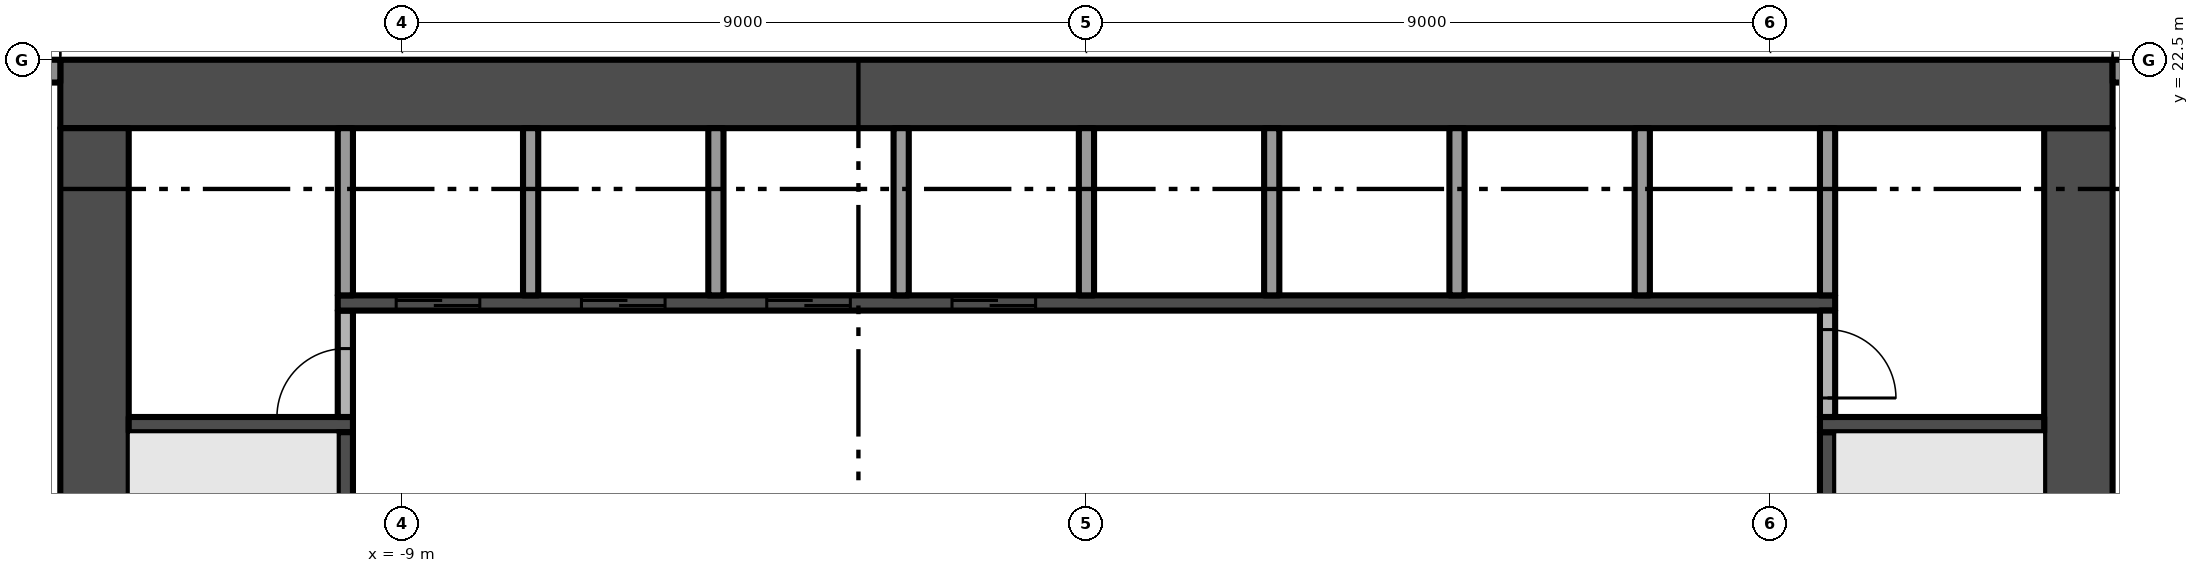
"""IFC4 building model, lengths in metres.
Left out: names, types, materials, properties, quantities, classifications, styles, units other than length and angle.
Written with IfcOpenShell. Run it as: python <this file> out.ifc"""

import sys

from ifc_helpers import new_model, si_unit, direction, frame, frame_2d, origin, place, context, subcontext, project, spatial, rectangle, extrude, element, fill, save


model = new_model("IFC4")
c1 = context("Model", 3, precision=1e-05, world=origin(), true_north=direction((0.0, 1.0)))
c2 = subcontext(c1, "Body", "Model", "MODEL_VIEW")
j1 = project(units=[si_unit("LENGTHUNIT", "METRE"), si_unit("PLANEANGLEUNIT", "RADIAN")], contexts=[c1])
p1 = place(None, origin())
s1 = spatial("IfcSite", under=j1, at=p1, CompositionType="ELEMENT")
p2 = place(p1, origin())
s2 = spatial("IfcBuilding", under=s1, at=p2, CompositionType="ELEMENT")
p3 = place(p2, frame((0.0, 0.0, 45.4)))
s3 = spatial("IfcBuildingStorey", under=s2, at=p3, CompositionType="ELEMENT", Elevation=45.4)
p4 = place(p3, frame((13.05, 5.4, -0.3), z_axis=(0.0, 0.0, 1.0), x_axis=(0.0, 1.0, 0.0)))
e1 = element("IfcWall", 1, at=p4, inside=s3, PredefinedType="SHEAR", context=c2, shape_type="SweptSolid", body=[
    extrude(rectangle(XDim=16.2, YDim=0.9, at=frame_2d((8.1, 0.0))), origin(), (0.0, 0.0, 1.0), 3.8),
])
p5 = place(p4, frame((6.0, 0.0, 0.3)))
e2 = element("IfcOpeningElement", 2, at=p5, cuts=e1, PredefinedType="OPENING", context=c2, shape_type="SweptSolid", body=[
    extrude(rectangle(XDim=1.2, YDim=2.2, at=frame_2d((0.6, 1.1))), frame((0.0, 0.46, 0.0), z_axis=(0.0, -1.0, 0.0), x_axis=(1.0, 0.0, 0.0)), (0.0, 0.0, 1.0), 0.92),
])
p6 = place(p3, frame((13.5, 22.05, -0.3), z_axis=(0.0, 0.0, 1.0), x_axis=(-1.0, 0.0, 0.0)))
e3 = element("IfcWall", 3, at=p6, inside=s3, PredefinedType="SHEAR", context=c2, shape_type="SweptSolid", body=[
    extrude(rectangle(XDim=27.0, YDim=0.9, at=frame_2d((13.5, 0.0))), origin(), (0.0, 0.0, 1.0), 3.8),
])
p7 = place(p3, frame((-13.05, 21.6, -0.3), z_axis=(0.0, 0.0, 1.0), x_axis=(0.0, -1.0, 0.0)))
e4 = element("IfcWall", 4, at=p7, inside=s3, PredefinedType="SHEAR", context=c2, shape_type="SweptSolid", body=[
    extrude(rectangle(XDim=16.2, YDim=0.9, at=frame_2d((8.1, 0.0))), origin(), (0.0, 0.0, 1.0), 3.8),
])
p8 = place(p7, frame((9.0, 0.0, 0.3)))
e5 = element("IfcOpeningElement", 5, at=p8, cuts=e4, PredefinedType="OPENING", context=c2, shape_type="SweptSolid", body=[
    extrude(rectangle(XDim=1.2, YDim=2.2, at=frame_2d((0.6, 1.1))), frame((0.0, 0.46, 0.0), z_axis=(0.0, -1.0, 0.0), x_axis=(1.0, 0.0, 0.0)), (0.0, 0.0, 1.0), 0.92),
])
p9 = place(p3, frame((13.5, 22.35, 0.0), z_axis=(0.0, 0.0, 1.0), x_axis=(1.0, 0.0, 0.0)))
e6 = element("IfcWall", 6, at=p9, inside=s3, PredefinedType="SOLIDWALL", context=c2, shape_type="SweptSolid", body=[
    extrude(rectangle(XDim=3.8, YDim=0.3, at=frame_2d((1.9, 0.0))), origin(), (0.0, 0.0, 1.0), 3.5),
])
p10 = place(p9, frame((0.85, 0.0, 0.45)))
e7 = element("IfcOpeningElement", 7, at=p10, cuts=e6, PredefinedType="OPENING", context=c2, shape_type="SweptSolid", body=[
    extrude(rectangle(XDim=2.65, YDim=2.65, at=frame_2d((1.325, 1.325))), frame((0.0, 0.16, 0.0), z_axis=(0.0, -1.0, 0.0), x_axis=(1.0, 0.0, 0.0)), (0.0, 0.0, 1.0), 0.32),
])
p11 = place(p3, frame((-17.3, 22.35, 0.0), z_axis=(0.0, 0.0, 1.0), x_axis=(1.0, 0.0, 0.0)))
e8 = element("IfcWall", 8, at=p11, inside=s3, PredefinedType="SOLIDWALL", context=c2, shape_type="SweptSolid", body=[
    extrude(rectangle(XDim=3.8, YDim=0.3, at=frame_2d((1.9, 0.0))), origin(), (0.0, 0.0, 1.0), 3.5),
])
p12 = place(p11, frame((0.3, 0.0, 0.0)))
e9 = element("IfcOpeningElement", 9, at=p12, cuts=e8, PredefinedType="OPENING", context=c2, shape_type="SweptSolid", body=[
    extrude(rectangle(XDim=2.65, YDim=2.4, at=frame_2d((1.325, 1.2))), frame((0.0, 0.16, 0.0), z_axis=(0.0, -1.0, 0.0), x_axis=(1.0, 0.0, 0.0)), (0.0, 0.0, 1.0), 0.32),
])
p13 = place(p3, frame((-12.6, 17.7, 0.0), z_axis=(0.0, 0.0, 1.0), x_axis=(1.0, 0.0, 0.0)))
e10 = element("IfcWall", 10, at=p13, inside=s3, PredefinedType="SHEAR", context=c2, shape_type="SweptSolid", body=[
    extrude(rectangle(XDim=2.95, YDim=0.2, at=frame_2d((1.475, 0.0))), origin(), (0.0, 0.0, 1.0), 3.5),
])
p14 = place(p3, frame((-9.75, 16.1, 0.0), z_axis=(0.0, 0.0, 1.0), x_axis=(0.0, 1.0, 0.0)))
e11 = element("IfcWall", 11, at=p14, inside=s3, PredefinedType="SHEAR", context=c2, shape_type="SweptSolid", body=[
    extrude(rectangle(XDim=1.5, YDim=0.2, at=frame_2d((0.75, 0.0))), origin(), (0.0, 0.0, 1.0), 3.5),
])
p15 = place(p3, frame((-9.75, 17.8, 0.0), z_axis=(0.0, 0.0, 1.0), x_axis=(0.0, 1.0, 0.0)))
e12 = element("IfcWall", 12, at=p15, inside=s3, PredefinedType="PARTITIONING", context=c2, shape_type="SweptSolid", body=[
    extrude(rectangle(XDim=1.4, YDim=0.2, at=frame_2d((0.7, 0.0))), origin(), (0.0, 0.0, 1.0), 3.5),
])
p16 = place(p15, origin())
e13 = element("IfcOpeningElement", 13, at=p16, cuts=e12, PredefinedType="OPENING", context=c2, shape_type="SweptSolid", body=[
    extrude(rectangle(XDim=0.9, YDim=2.1, at=frame_2d((0.45, 1.05))), frame((0.0, 0.11, 0.0), z_axis=(0.0, -1.0, 0.0), x_axis=(1.0, 0.0, 0.0)), (0.0, 0.0, 1.0), 0.22),
])
p17 = place(p3, frame((-9.85, 19.3, 0.0), z_axis=(0.0, 0.0, 1.0), x_axis=(1.0, 0.0, 0.0)))
e14 = element("IfcWall", 14, at=p17, inside=s3, PredefinedType="SHEAR", context=c2, shape_type="SweptSolid", body=[
    extrude(rectangle(XDim=19.7, YDim=0.2, at=frame_2d((9.85, 0.0))), origin(), (0.0, 0.0, 1.0), 3.5),
])
p18 = place(p17, frame((0.769, 0.0, 0.0)))
e15 = element("IfcOpeningElement", 15, at=p18, cuts=e14, PredefinedType="OPENING", context=c2, shape_type="SweptSolid", body=[
    extrude(rectangle(XDim=1.1, YDim=2.1, at=frame_2d((0.55, 1.05))), frame((0.0, 0.11, 0.0), z_axis=(0.0, -1.0, 0.0), x_axis=(1.0, 0.0, 0.0)), (0.0, 0.0, 1.0), 0.22),
])
p19 = place(p17, frame((3.206, 0.0, 0.0)))
e16 = element("IfcOpeningElement", 16, at=p19, cuts=e14, PredefinedType="OPENING", context=c2, shape_type="SweptSolid", body=[
    extrude(rectangle(XDim=1.1, YDim=2.1, at=frame_2d((0.55, 1.05))), frame((0.0, 0.11, 0.0), z_axis=(0.0, -1.0, 0.0), x_axis=(1.0, 0.0, 0.0)), (0.0, 0.0, 1.0), 0.22),
])
p20 = place(p17, frame((5.644, 0.0, 0.0)))
e17 = element("IfcOpeningElement", 17, at=p20, cuts=e14, PredefinedType="OPENING", context=c2, shape_type="SweptSolid", body=[
    extrude(rectangle(XDim=1.1, YDim=2.1, at=frame_2d((0.55, 1.05))), frame((0.0, 0.11, 0.0), z_axis=(0.0, -1.0, 0.0), x_axis=(1.0, 0.0, 0.0)), (0.0, 0.0, 1.0), 0.22),
])
p21 = place(p17, frame((8.081, 0.0, 0.0)))
e18 = element("IfcOpeningElement", 18, at=p21, cuts=e14, PredefinedType="OPENING", context=c2, shape_type="SweptSolid", body=[
    extrude(rectangle(XDim=1.1, YDim=2.1, at=frame_2d((0.55, 1.05))), frame((0.0, 0.11, 0.0), z_axis=(0.0, -1.0, 0.0), x_axis=(1.0, 0.0, 0.0)), (0.0, 0.0, 1.0), 0.22),
])
for number, where, z_axis, x_axis in (
    (19, (-9.75, 19.4, 0.0), (0.0, 0.0, 1.0), (0.0, 1.0, 0.0)),
    (20, (-7.312, 19.4, 0.0), (0.0, 0.0, 1.0), (0.0, 1.0, 0.0)),
    (21, (-4.875, 19.4, 0.0), (0.0, 0.0, 1.0), (0.0, 1.0, 0.0)),
    (22, (-2.438, 19.4, 0.0), (0.0, 0.0, 1.0), (0.0, 1.0, 0.0)),
    (23, (0.0, 19.4, 0.0), (0.0, 0.0, 1.0), (0.0, 1.0, 0.0)),
    (24, (2.438, 19.4, 0.0), (0.0, 0.0, 1.0), (0.0, 1.0, 0.0)),
    (25, (4.875, 19.4, 0.0), (0.0, 0.0, 1.0), (0.0, 1.0, 0.0)),
    (26, (7.312, 19.4, 0.0), (0.0, 0.0, 1.0), (0.0, 1.0, 0.0)),
):
    element("IfcWall", number, at=place(p3, frame(where, z_axis=z_axis, x_axis=x_axis)), inside=s3, PredefinedType="PARTITIONING", context=c2, shape_type="SweptSolid", body=[
        extrude(rectangle(XDim=2.2, YDim=0.2, at=frame_2d((1.1, 0.0))), origin(), (0.0, 0.0, 1.0), 3.5),
    ])
p22 = place(p3, frame((9.75, 16.1, 0.0), z_axis=(0.0, 0.0, 1.0), x_axis=(0.0, 1.0, 0.0)))
e27 = element("IfcWall", 27, at=p22, inside=s3, PredefinedType="SHEAR", context=c2, shape_type="SweptSolid", body=[
    extrude(rectangle(XDim=1.5, YDim=0.2, at=frame_2d((0.75, 0.0))), origin(), (0.0, 0.0, 1.0), 3.5),
])
p23 = place(p3, frame((9.65, 17.7, 0.0), z_axis=(0.0, 0.0, 1.0), x_axis=(1.0, 0.0, 0.0)))
e28 = element("IfcWall", 28, at=p23, inside=s3, PredefinedType="SHEAR", context=c2, shape_type="SweptSolid", body=[
    extrude(rectangle(XDim=2.95, YDim=0.2, at=frame_2d((1.475, 0.0))), origin(), (0.0, 0.0, 1.0), 3.5),
])
p24 = place(p3, frame((9.75, 19.2, 0.0), z_axis=(0.0, 0.0, 1.0), x_axis=(0.0, -1.0, 0.0)))
e29 = element("IfcWall", 29, at=p24, inside=s3, PredefinedType="PARTITIONING", context=c2, shape_type="SweptSolid", body=[
    extrude(rectangle(XDim=1.4, YDim=0.2, at=frame_2d((0.7, 0.0))), origin(), (0.0, 0.0, 1.0), 3.5),
])
p25 = place(p24, frame((0.25, 0.0, 0.0)))
e30 = element("IfcOpeningElement", 30, at=p25, cuts=e29, PredefinedType="OPENING", context=c2, shape_type="SweptSolid", body=[
    extrude(rectangle(XDim=0.9, YDim=2.1, at=frame_2d((0.45, 1.05))), frame((0.0, 0.11, 0.0), z_axis=(0.0, -1.0, 0.0), x_axis=(1.0, 0.0, 0.0)), (0.0, 0.0, 1.0), 0.22),
])
p26 = place(p3, frame((9.75, 19.4, 0.0), z_axis=(0.0, 0.0, 1.0), x_axis=(0.0, 1.0, 0.0)))
e31 = element("IfcWall", 31, at=p26, inside=s3, PredefinedType="PARTITIONING", context=c2, shape_type="SweptSolid", body=[
    extrude(rectangle(XDim=2.2, YDim=0.2, at=frame_2d((1.1, 0.0))), origin(), (0.0, 0.0, 1.0), 3.5),
])
p27 = place(p18, origin())
e32 = element("IfcDoor", 32, at=p27, inside=s3, OperationType="SLIDING_TO_LEFT", PredefinedType="DOOR", context=c2, shape_type="SweptSolid", body=[
    extrude(rectangle(XDim=1.1, YDim=2.1, at=frame_2d((0.55, 1.05))), frame((0.0, 0.025, 0.0), z_axis=(0.0, -1.0, 0.0), x_axis=(1.0, 0.0, 0.0)), (0.0, 0.0, 1.0), 0.05),
])
fill(e15, e32)
p28 = place(p19, origin())
e33 = element("IfcDoor", 33, at=p28, inside=s3, OperationType="SLIDING_TO_LEFT", PredefinedType="DOOR", context=c2, shape_type="SweptSolid", body=[
    extrude(rectangle(XDim=1.1, YDim=2.1, at=frame_2d((0.55, 1.05))), frame((0.0, 0.025, 0.0), z_axis=(0.0, -1.0, 0.0), x_axis=(1.0, 0.0, 0.0)), (0.0, 0.0, 1.0), 0.05),
])
fill(e16, e33)
p29 = place(p20, origin())
e34 = element("IfcDoor", 34, at=p29, inside=s3, OperationType="SLIDING_TO_LEFT", PredefinedType="DOOR", context=c2, shape_type="SweptSolid", body=[
    extrude(rectangle(XDim=1.1, YDim=2.1, at=frame_2d((0.55, 1.05))), frame((0.0, 0.025, 0.0), z_axis=(0.0, -1.0, 0.0), x_axis=(1.0, 0.0, 0.0)), (0.0, 0.0, 1.0), 0.05),
])
fill(e17, e34)
p30 = place(p21, origin())
e35 = element("IfcDoor", 35, at=p30, inside=s3, OperationType="SLIDING_TO_LEFT", PredefinedType="DOOR", context=c2, shape_type="SweptSolid", body=[
    extrude(rectangle(XDim=1.1, YDim=2.1, at=frame_2d((0.55, 1.05))), frame((0.0, 0.025, 0.0), z_axis=(0.0, -1.0, 0.0), x_axis=(1.0, 0.0, 0.0)), (0.0, 0.0, 1.0), 0.05),
])
fill(e18, e35)
p31 = place(p16, origin())
e36 = element("IfcDoor", 36, at=p31, inside=s3, OperationType="SINGLE_SWING_LEFT", PredefinedType="DOOR", context=c2, shape_type="SweptSolid", body=[
    extrude(rectangle(XDim=0.9, YDim=2.1, at=frame_2d((0.45, 1.05))), frame((0.0, 0.025, 0.0), z_axis=(0.0, -1.0, 0.0), x_axis=(1.0, 0.0, 0.0)), (0.0, 0.0, 1.0), 0.05),
])
fill(e13, e36)
p32 = place(p25, origin())
e37 = element("IfcDoor", 37, at=p32, inside=s3, OperationType="SINGLE_SWING_RIGHT", PredefinedType="DOOR", context=c2, shape_type="SweptSolid", body=[
    extrude(rectangle(XDim=0.9, YDim=2.1, at=frame_2d((0.45, 1.05))), frame((0.0, 0.025, 0.0), z_axis=(0.0, -1.0, 0.0), x_axis=(1.0, 0.0, 0.0)), (0.0, 0.0, 1.0), 0.05),
])
fill(e30, e37)
save(model, sys.argv[1])
